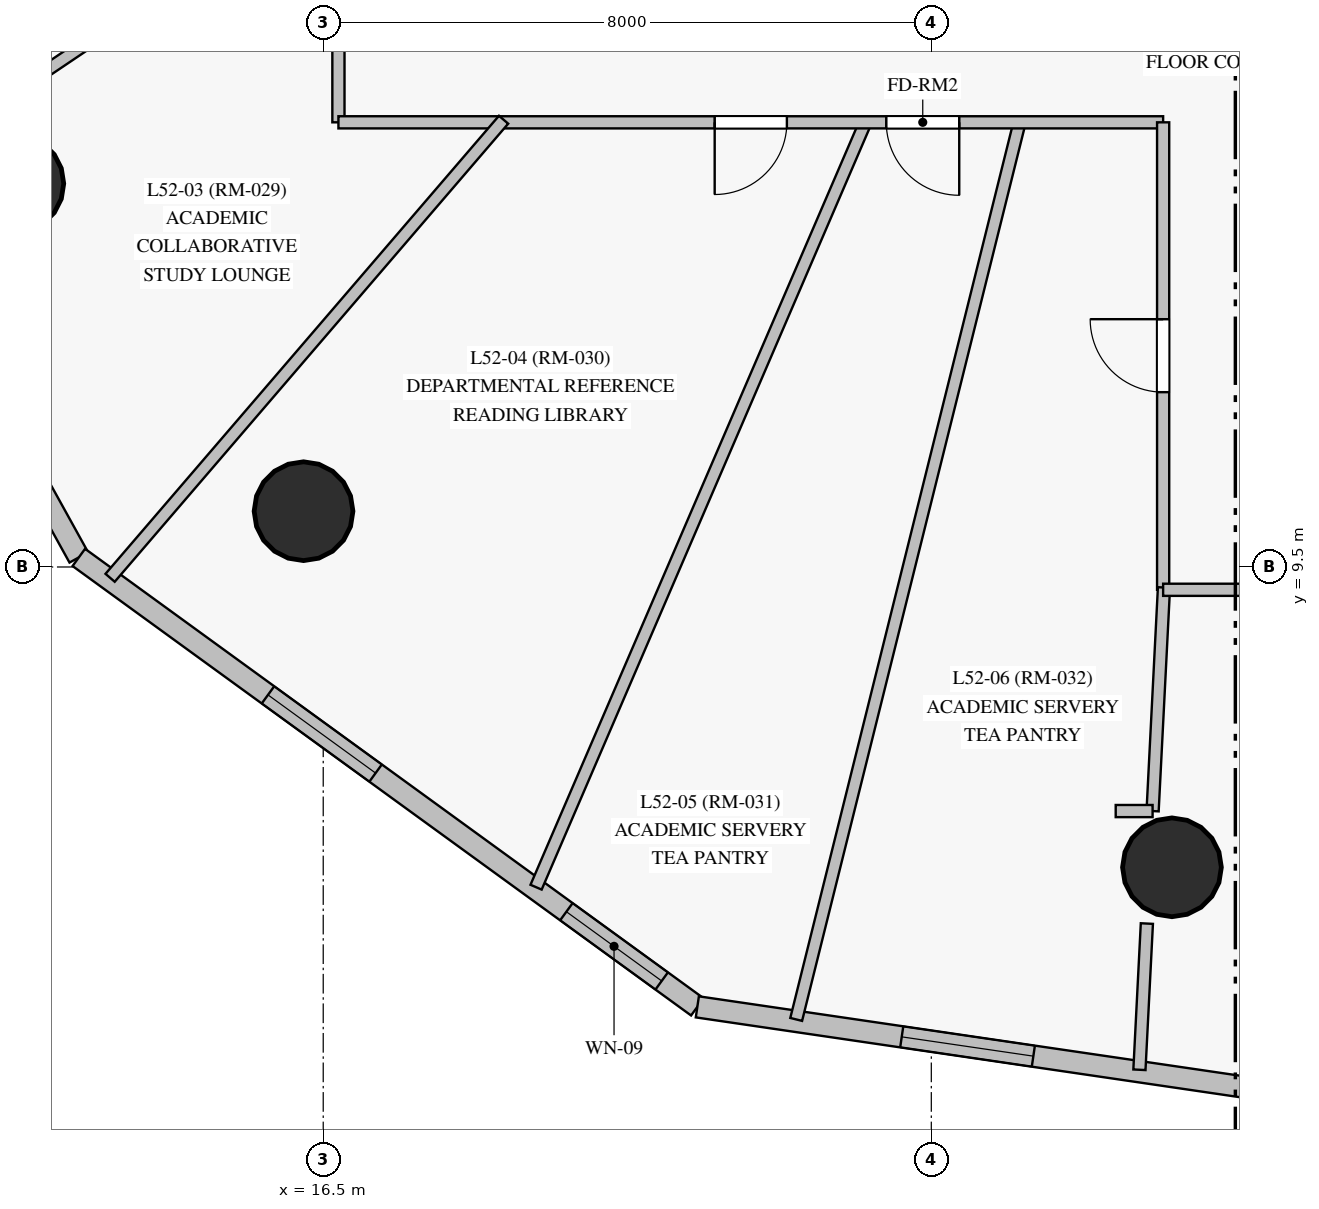
"""IFC4 building model, lengths in metres.
Left out: names, types, materials, properties, quantities, classifications, styles, units other than length and angle.
Written with IfcOpenShell. Run it as: python <this file> out.ifc"""

import sys

from ifc_helpers import new_model, si_unit, direction, frame, frame_2d, origin, origin_with_axes, origin_2d, place, context, subcontext, project, spatial, rectangle, circle, extrude, source, transform, mapped, element, fill, save


model = new_model("IFC4")
c1 = context("Model", 3, precision=1e-05, world=origin(), true_north=direction((0.0, 1.0)))
c2 = subcontext(c1, "Body", "Model", "MODEL_VIEW")
j1 = project(units=[si_unit("LENGTHUNIT", "METRE"), si_unit("PLANEANGLEUNIT", "RADIAN")], contexts=[c1])
p1 = place(None, origin())
s1 = spatial("IfcSite", under=j1, at=p1, CompositionType="ELEMENT")
p2 = place(p1, origin())
s2 = spatial("IfcBuilding", under=s1, at=p2, CompositionType="ELEMENT")
p3 = place(p2, frame((0.0, 0.0, 180.95)))
s3 = spatial("IfcBuildingStorey", under=s2, at=p3, CompositionType="ELEMENT", Elevation=180.95)
m1 = source(origin_with_axes(), c2, "Body", "SweptSolid", [
    extrude(circle(Radius=0.65, at=origin_2d()), origin(), (0.0, 0.0, 1.0), 3.05),
])
for number, where, z_axis, x_axis in (
    (1, (12.436, 14.544, 0.0), (0.0, 0.0, 1.0), (1.0, 0.0, 0.0)),
    (2, (16.241, 10.234, 0.0), (0.0, 0.0, 1.0), (1.0, 0.0, 0.0)),
    (3, (27.666, 5.549, 0.0), (0.0, 0.0, 1.0), (1.0, 0.0, 0.0)),
):
    element("IfcColumn", number, at=place(p3, frame(where, z_axis=z_axis, x_axis=x_axis)), inside=s3, PredefinedType="COLUMN", context=c2, shape_type="MappedRepresentation", body=[
        mapped(m1, transform((0.0, 0.0, 0.0), scale=1.0)),
    ])
p4 = place(p3, frame((6.463, 21.948, 0.0), z_axis=(0.0, 0.0, 1.0), x_axis=(0.484331046547, -0.874884813762, 0.0)))
e4 = element("IfcWall", 4, at=p4, inside=s3, PredefinedType="SOLIDWALL", context=c2, shape_type="SweptSolid", body=[
    extrude(rectangle(XDim=14.084, YDim=0.28, at=frame_2d((7.042, 0.0))), origin(), (0.0, 0.0, 1.0), 2.825),
])
p5 = place(p4, frame((1.457, 0.0, 0.85)))
e5 = element("IfcOpeningElement", 5, at=p5, cuts=e4, PredefinedType="OPENING", context=c2, shape_type="SweptSolid", body=[
    extrude(rectangle(XDim=1.75, YDim=1.65, at=frame_2d((0.875, 0.825))), frame((0.0, 0.15, 0.0), z_axis=(0.0, -1.0, 0.0), x_axis=(1.0, 0.0, 0.0)), (0.0, 0.0, 1.0), 0.3),
])
p6 = place(p4, frame((5.36, 0.0, 0.85)))
e6 = element("IfcOpeningElement", 6, at=p6, cuts=e4, PredefinedType="OPENING", context=c2, shape_type="SweptSolid", body=[
    extrude(rectangle(XDim=1.75, YDim=1.65, at=frame_2d((0.875, 0.825))), frame((0.0, 0.15, 0.0), z_axis=(0.0, -1.0, 0.0), x_axis=(1.0, 0.0, 0.0)), (0.0, 0.0, 1.0), 0.3),
])
p7 = place(p4, frame((10.391, 0.0, 0.85)))
e7 = element("IfcOpeningElement", 7, at=p7, cuts=e4, PredefinedType="OPENING", context=c2, shape_type="SweptSolid", body=[
    extrude(rectangle(XDim=1.75, YDim=1.65, at=frame_2d((0.875, 0.825))), frame((0.0, 0.15, 0.0), z_axis=(0.0, -1.0, 0.0), x_axis=(1.0, 0.0, 0.0)), (0.0, 0.0, 1.0), 0.3),
])
p8 = place(p3, frame((13.284, 9.626, 0.0), z_axis=(0.0, 0.0, 1.0), x_axis=(0.8089753159, -0.587842613516, 0.0)))
e8 = element("IfcWall", 8, at=p8, inside=s3, PredefinedType="SOLIDWALL", context=c2, shape_type="SweptSolid", body=[
    extrude(rectangle(XDim=10.059, YDim=0.28, at=frame_2d((5.03, 0.0))), origin(), (0.0, 0.0, 1.0), 2.825),
])
p9 = place(p8, frame((3.076, 0.0, 0.85)))
e9 = element("IfcOpeningElement", 9, at=p9, cuts=e8, PredefinedType="OPENING", context=c2, shape_type="SweptSolid", body=[
    extrude(rectangle(XDim=1.75, YDim=1.65, at=frame_2d((0.875, 0.825))), frame((0.0, 0.15, 0.0), z_axis=(0.0, -1.0, 0.0), x_axis=(1.0, 0.0, 0.0)), (0.0, 0.0, 1.0), 0.3),
])
p10 = place(p8, frame((7.929, 0.0, 0.85)))
e10 = element("IfcOpeningElement", 10, at=p10, cuts=e8, PredefinedType="OPENING", context=c2, shape_type="SweptSolid", body=[
    extrude(rectangle(XDim=1.55, YDim=1.65, at=frame_2d((0.775, 0.825))), frame((0.0, 0.15, 0.0), z_axis=(0.0, -1.0, 0.0), x_axis=(1.0, 0.0, 0.0)), (0.0, 0.0, 1.0), 0.3),
])
p11 = place(p3, frame((21.422, 3.713, 0.0), z_axis=(0.0, 0.0, 1.0), x_axis=(0.989415023511, -0.145113442696, 0.0)))
e11 = element("IfcWall", 11, at=p11, inside=s3, PredefinedType="SOLIDWALL", context=c2, shape_type="SweptSolid", body=[
    extrude(rectangle(XDim=12.837, YDim=0.28, at=frame_2d((6.418, 0.0))), origin(), (0.0, 0.0, 1.0), 2.825),
])
p12 = place(p11, frame((2.718, 0.0, 0.85)))
e12 = element("IfcOpeningElement", 12, at=p12, cuts=e11, PredefinedType="OPENING", context=c2, shape_type="SweptSolid", body=[
    extrude(rectangle(XDim=1.75, YDim=1.65, at=frame_2d((0.875, 0.825))), frame((0.0, 0.15, 0.0), z_axis=(0.0, -1.0, 0.0), x_axis=(1.0, 0.0, 0.0)), (0.0, 0.0, 1.0), 0.3),
])
p13 = place(p11, frame((8.449, 0.0, 0.85)))
e13 = element("IfcOpeningElement", 13, at=p13, cuts=e11, PredefinedType="OPENING", context=c2, shape_type="SweptSolid", body=[
    extrude(rectangle(XDim=1.75, YDim=1.65, at=frame_2d((0.875, 0.825))), frame((0.0, 0.15, 0.0), z_axis=(0.0, -1.0, 0.0), x_axis=(1.0, 0.0, 0.0)), (0.0, 0.0, 1.0), 0.3),
])
p14 = place(p3, frame((16.7, 15.35, 0.0), z_axis=(0.0, 0.0, 1.0), x_axis=(0.0, 1.0, 0.0)))
e14 = element("IfcWall", 14, at=p14, inside=s3, PredefinedType="PARTITIONING", context=c2, shape_type="SweptSolid", body=[
    extrude(rectangle(XDim=22.3, YDim=0.16, at=frame_2d((11.15, 0.0))), origin(), (0.0, 0.0, 1.0), 2.275),
])
p15 = place(p14, frame((9.315, 0.0, 0.0)))
e15 = element("IfcOpeningElement", 15, at=p15, cuts=e14, PredefinedType="OPENING", context=c2, shape_type="SweptSolid", body=[
    extrude(rectangle(XDim=0.95, YDim=2.15, at=frame_2d((0.475, 1.075))), frame((0.0, 0.09, 0.0), z_axis=(0.0, -1.0, 0.0), x_axis=(1.0, 0.0, 0.0)), (0.0, 0.0, 1.0), 0.18),
])
p16 = place(p14, frame((7.33, 0.0, 0.0)))
e16 = element("IfcOpeningElement", 16, at=p16, cuts=e14, PredefinedType="OPENING", context=c2, shape_type="SweptSolid", body=[
    extrude(rectangle(XDim=0.96, YDim=2.15, at=frame_2d((0.48, 1.075))), frame((0.0, 0.09, 0.0), z_axis=(0.0, -1.0, 0.0), x_axis=(1.0, 0.0, 0.0)), (0.0, 0.0, 1.0), 0.18),
])
p17 = place(p14, frame((1.021, 0.0, 0.0)))
e17 = element("IfcOpeningElement", 17, at=p17, cuts=e14, PredefinedType="OPENING", context=c2, shape_type="SweptSolid", body=[
    extrude(rectangle(XDim=0.95, YDim=2.15, at=frame_2d((0.475, 1.075))), frame((0.0, 0.09, 0.0), z_axis=(0.0, -1.0, 0.0), x_axis=(1.0, 0.0, 0.0)), (0.0, 0.0, 1.0), 0.18),
])
p18 = place(p14, frame((18.396, 0.0, 0.0)))
e18 = element("IfcOpeningElement", 18, at=p18, cuts=e14, PredefinedType="OPENING", context=c2, shape_type="SweptSolid", body=[
    extrude(rectangle(XDim=0.96, YDim=2.15, at=frame_2d((0.48, 1.075))), frame((0.0, 0.09, 0.0), z_axis=(0.0, -1.0, 0.0), x_axis=(1.0, 0.0, 0.0)), (0.0, 0.0, 1.0), 0.18),
])
p19 = place(p14, frame((14.36, 0.0, 0.0)))
e19 = element("IfcOpeningElement", 19, at=p19, cuts=e14, PredefinedType="OPENING", context=c2, shape_type="SweptSolid", body=[
    extrude(rectangle(XDim=0.96, YDim=2.15, at=frame_2d((0.48, 1.075))), frame((0.0, 0.09, 0.0), z_axis=(0.0, -1.0, 0.0), x_axis=(1.0, 0.0, 0.0)), (0.0, 0.0, 1.0), 0.18),
])
p20 = place(p14, frame((11.115, 0.0, 0.0)))
e20 = element("IfcOpeningElement", 20, at=p20, cuts=e14, PredefinedType="OPENING", context=c2, shape_type="SweptSolid", body=[
    extrude(rectangle(XDim=0.95, YDim=2.15, at=frame_2d((0.475, 1.075))), frame((0.0, 0.09, 0.0), z_axis=(0.0, -1.0, 0.0), x_axis=(1.0, 0.0, 0.0)), (0.0, 0.0, 1.0), 0.18),
])
p21 = place(p3, frame((25.669, 15.379, 0.0), z_axis=(0.0, 0.0, 1.0), x_axis=(-0.241645060657, -0.970364707035, 0.0)))
e21 = element("IfcWall", 21, at=p21, inside=s3, PredefinedType="PARTITIONING", context=c2, shape_type="SweptSolid", body=[
    extrude(rectangle(XDim=12.193, YDim=0.16, at=frame_2d((6.096, 0.0))), origin(), (0.0, 0.0, 1.0), 2.825),
])
p22 = place(p3, frame((23.645, 15.378, 0.0), z_axis=(0.0, 0.0, 1.0), x_axis=(-0.39550652106, -0.91846316845, 0.0)))
e22 = element("IfcWall", 22, at=p22, inside=s3, PredefinedType="PARTITIONING", context=c2, shape_type="SweptSolid", body=[
    extrude(rectangle(XDim=10.986, YDim=0.16, at=frame_2d((5.493, 0.0))), origin(), (0.0, 0.0, 1.0), 2.825),
])
p23 = place(p3, frame((27.55, 15.35, 0.0), z_axis=(0.0, 0.0, 1.0), x_axis=(-1.0, 0.0, 0.0)))
e23 = element("IfcWall", 23, at=p23, inside=s3, PredefinedType="PARTITIONING", context=c2, shape_type="SweptSolid", body=[
    extrude(rectangle(XDim=10.85, YDim=0.16, at=frame_2d((5.425, 0.0))), origin(), (0.0, 0.0, 1.0), 2.375),
])
p24 = place(p23, frame((4.95, 0.0, 0.0)))
e24 = element("IfcOpeningElement", 24, at=p24, cuts=e23, PredefinedType="OPENING", context=c2, shape_type="SweptSolid", body=[
    extrude(rectangle(XDim=0.95, YDim=2.15, at=frame_2d((0.475, 1.075))), frame((0.0, 0.09, 0.0), z_axis=(0.0, -1.0, 0.0), x_axis=(1.0, 0.0, 0.0)), (0.0, 0.0, 1.0), 0.18),
])
p25 = place(p23, frame((2.683, 0.0, 0.0)))
e25 = element("IfcOpeningElement", 25, at=p25, cuts=e23, PredefinedType="OPENING", context=c2, shape_type="SweptSolid", body=[
    extrude(rectangle(XDim=0.96, YDim=2.15, at=frame_2d((0.48, 1.075))), frame((0.0, 0.09, 0.0), z_axis=(0.0, -1.0, 0.0), x_axis=(1.0, 0.0, 0.0)), (0.0, 0.0, 1.0), 0.18),
])
p26 = place(p3, frame((18.873, 15.384, 0.0), z_axis=(0.0, 0.0, 1.0), x_axis=(-0.651578085273, -0.758581570295, 0.0)))
e26 = element("IfcWall", 26, at=p26, inside=s3, PredefinedType="PARTITIONING", context=c2, shape_type="SweptSolid", body=[
    extrude(rectangle(XDim=7.945, YDim=0.16, at=frame_2d((3.972, 0.0))), origin(), (0.0, 0.0, 1.0), 2.275),
])
p27 = place(p3, frame((27.55, 9.2, 0.0), z_axis=(0.0, 0.0, 1.0), x_axis=(0.0, 1.0, 0.0)))
e27 = element("IfcWall", 27, at=p27, inside=s3, PredefinedType="PARTITIONING", context=c2, shape_type="SweptSolid", body=[
    extrude(rectangle(XDim=6.15, YDim=0.16, at=frame_2d((3.075, 0.0))), origin(), (0.0, 0.0, 1.0), 2.275),
])
p28 = place(p27, frame((2.6, 0.0, 0.0)))
e28 = element("IfcOpeningElement", 28, at=p28, cuts=e27, PredefinedType="OPENING", context=c2, shape_type="SweptSolid", body=[
    extrude(rectangle(XDim=0.96, YDim=2.15, at=frame_2d((0.48, 1.075))), frame((0.0, 0.09, 0.0), z_axis=(0.0, -1.0, 0.0), x_axis=(1.0, 0.0, 0.0)), (0.0, 0.0, 1.0), 0.18),
])
p29 = place(p3, frame((16.725, 18.638, 0.0), z_axis=(0.0, 0.0, 1.0), x_axis=(-0.829279952389, -0.558833392493, 0.0)))
e29 = element("IfcWall", 29, at=p29, inside=s3, PredefinedType="PARTITIONING", context=c2, shape_type="SweptSolid", body=[
    extrude(rectangle(XDim=6.001, YDim=0.16, at=frame_2d((3.001, 0.0))), origin(), (0.0, 0.0, 1.0), 2.825),
])
p30 = place(p3, frame((27.561, 9.23, 0.0), z_axis=(0.0, 0.0, 1.0), x_axis=(-0.050822498854, -0.998707701788, 0.0)))
e30 = element("IfcWall", 30, at=p30, inside=s3, PredefinedType="PARTITIONING", context=c2, shape_type="SweptSolid", body=[
    extrude(rectangle(XDim=2.945, YDim=0.16, at=frame_2d((1.472, 0.0))), origin(), (0.0, 0.0, 1.0), 2.275),
])
p31 = place(p3, frame((29.55, 9.2, 0.0), z_axis=(0.0, 0.0, 1.0), x_axis=(-1.0, 0.0, 0.0)))
e31 = element("IfcWall", 31, at=p31, inside=s3, PredefinedType="PARTITIONING", context=c2, shape_type="SweptSolid", body=[
    extrude(rectangle(XDim=2.0, YDim=0.16, at=frame_2d((1.0, 0.0))), origin(), (0.0, 0.0, 1.0), 2.495),
])
p32 = place(p3, frame((27.336, 4.809, 0.0), z_axis=(0.0, 0.0, 1.0), x_axis=(-0.050828995537, -0.998707371162, 0.0)))
e32 = element("IfcWall", 32, at=p32, inside=s3, PredefinedType="PARTITIONING", context=c2, shape_type="SweptSolid", body=[
    extrude(rectangle(XDim=1.926, YDim=0.16, at=frame_2d((0.963, 0.0))), origin(), (0.0, 0.0, 1.0), 2.825),
])
p33 = place(p3, frame((27.411, 6.289, 0.0), z_axis=(0.0, 0.0, 1.0), x_axis=(-1.0, 0.0, 0.0)))
e33 = element("IfcWall", 33, at=p33, inside=s3, PredefinedType="PARTITIONING", context=c2, shape_type="SweptSolid", body=[
    extrude(rectangle(XDim=0.485, YDim=0.16, at=frame_2d((0.243, 0.0))), origin(), (0.0, 0.0, 1.0), 2.275),
])
m2 = source(origin_with_axes(), c2, "Body", "SweptSolid", [
    extrude(rectangle(XDim=1.75, YDim=1.65, at=frame_2d((0.875, 0.825))), frame((0.0, 0.03, 0.0), z_axis=(0.0, -1.0, 0.0), x_axis=(1.0, 0.0, 0.0)), (0.0, 0.0, 1.0), 0.06),
])
p34 = place(p9, origin())
e34 = element("IfcWindow", 34, at=p34, inside=s3, PartitioningType="SINGLE_PANEL", PredefinedType="WINDOW", context=c2, shape_type="MappedRepresentation", body=[
    mapped(m2, transform((0.0, 0.0, 0.0), scale=1.0)),
])
fill(e9, e34)
m3 = source(origin_with_axes(), c2, "Body", "SweptSolid", [
    extrude(rectangle(XDim=1.55, YDim=1.65, at=frame_2d((0.775, 0.825))), frame((0.0, 0.03, 0.0), z_axis=(0.0, -1.0, 0.0), x_axis=(1.0, 0.0, 0.0)), (0.0, 0.0, 1.0), 0.06),
])
p35 = place(p10, origin())
e35 = element("IfcWindow", 35, at=p35, inside=s3, PartitioningType="SINGLE_PANEL", PredefinedType="WINDOW", context=c2, shape_type="MappedRepresentation", body=[
    mapped(m3, transform((0.0, 0.0, 0.0), scale=1.0)),
])
fill(e10, e35)
p36 = place(p12, origin())
e36 = element("IfcWindow", 36, at=p36, inside=s3, PartitioningType="SINGLE_PANEL", PredefinedType="WINDOW", context=c2, shape_type="MappedRepresentation", body=[
    mapped(m2, transform((0.0, 0.0, 0.0), scale=1.0)),
])
fill(e12, e36)
m4 = source(origin_with_axes(), c2, "Body", "SweptSolid", [
    extrude(rectangle(XDim=0.95, YDim=2.15, at=frame_2d((0.475, 1.075))), frame((0.0, 0.025, 0.0), z_axis=(0.0, -1.0, 0.0), x_axis=(1.0, 0.0, 0.0)), (0.0, 0.0, 1.0), 0.05),
])
p37 = place(p24, origin())
e37 = element("IfcDoor", 37, at=p37, inside=s3, OperationType="SINGLE_SWING_RIGHT", PredefinedType="DOOR", context=c2, shape_type="MappedRepresentation", body=[
    mapped(m4, transform((0.0, 0.0, 0.0), scale=1.0)),
])
fill(e24, e37)
m5 = source(origin_with_axes(), c2, "Body", "SweptSolid", [
    extrude(rectangle(XDim=0.96, YDim=2.15, at=frame_2d((0.48, 1.075))), frame((0.0, 0.025, 0.0), z_axis=(0.0, -1.0, 0.0), x_axis=(1.0, 0.0, 0.0)), (0.0, 0.0, 1.0), 0.05),
])
p38 = place(p25, origin())
e38 = element("IfcDoor", 38, at=p38, inside=s3, OperationType="SINGLE_SWING_LEFT", PredefinedType="DOOR", context=c2, shape_type="MappedRepresentation", body=[
    mapped(m5, transform((0.0, 0.0, 0.0), scale=1.0)),
])
fill(e25, e38)
p39 = place(p28, origin())
e39 = element("IfcDoor", 39, at=p39, inside=s3, OperationType="SINGLE_SWING_RIGHT", PredefinedType="DOOR", context=c2, shape_type="MappedRepresentation", body=[
    mapped(m5, transform((0.0, 0.0, 0.0), scale=1.0)),
])
fill(e28, e39)
save(model, sys.argv[1])
